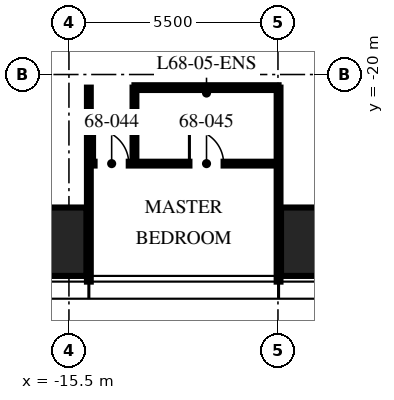
"""IFC4 building model, lengths in metres.
Left out: names, types, materials, properties, quantities, classifications, styles, units other than length and angle.
Written with IfcOpenShell. Run it as: python <this file> out.ifc"""

import sys

from ifc_helpers import new_model, si_unit, direction, frame, frame_2d, origin, origin_2d, place, context, subcontext, project, spatial, rectangle, hollow_rectangle, extrude, element, fill, save


model = new_model("IFC4")
c1 = context("Model", 3, precision=1e-05, world=origin(), true_north=direction((0.0, 1.0)))
c2 = subcontext(c1, "Body", "Model", "MODEL_VIEW")
j1 = project(units=[si_unit("LENGTHUNIT", "METRE"), si_unit("PLANEANGLEUNIT", "RADIAN")], contexts=[c1])
p1 = place(None, origin())
s1 = spatial("IfcSite", under=j1, at=p1, CompositionType="ELEMENT")
p2 = place(p1, origin())
s2 = spatial("IfcBuilding", under=s1, at=p2, CompositionType="ELEMENT")
p3 = place(p2, frame((0.0, 0.0, 270.75)))
s3 = spatial("IfcBuildingStorey", under=s2, at=p3, CompositionType="ELEMENT", Elevation=270.75)
for number, where, z_axis, x_axis in (
    (1, (-8.32, -24.4, 0.0), (0.0, 0.0, 1.0), (1.0, 0.0, 0.0)),
    (2, (-16.64, -24.4, 0.0), (0.0, 0.0, 1.0), (1.0, 0.0, 0.0)),
):
    element("IfcColumn", number, at=place(p3, frame(where, z_axis=z_axis, x_axis=x_axis)), inside=s3, PredefinedType="COLUMN", context=c2, shape_type="SweptSolid", body=[
        extrude(hollow_rectangle(XDim=3.2, YDim=1.8, WallThickness=0.14, at=origin_2d()), origin(), (0.0, 0.0, 1.0), 3.75),
    ])
for number, where, z_axis, x_axis in (
    (3, (-14.976, -20.345, 0.0), (0.0, 0.0, 1.0), (0.0, -1.0, 0.0)),
    (4, (-9.984, -20.345, 0.0), (0.0, 0.0, 1.0), (0.0, -1.0, 0.0)),
):
    element("IfcWall", number, at=place(p3, frame(where, z_axis=z_axis, x_axis=x_axis)), inside=s3, PredefinedType="PARTITIONING", context=c2, shape_type="SweptSolid", body=[
        extrude(rectangle(XDim=5.105, YDim=0.1, at=frame_2d((2.552, 0.0))), origin(), (0.0, 0.0, 1.0), 2.81),
    ])
p4 = place(p3, frame((-14.976, -22.345, 0.0), z_axis=(0.0, 0.0, 1.0), x_axis=(1.0, 0.0, 0.0)))
e5 = element("IfcWall", 5, at=p4, inside=s3, PredefinedType="PARTITIONING", context=c2, shape_type="SweptSolid", body=[
    extrude(rectangle(XDim=4.992, YDim=0.1, at=frame_2d((2.496, 0.0))), origin(), (0.0, 0.0, 1.0), 2.71),
])
p5 = place(p4, frame((0.15, 0.0, 0.0)))
e6 = element("IfcOpeningElement", 6, at=p5, cuts=e5, PredefinedType="OPENING", context=c2, shape_type="SweptSolid", body=[
    extrude(rectangle(XDim=0.9, YDim=2.1, at=frame_2d((0.45, 1.05))), frame((0.0, 0.06, 0.0), z_axis=(0.0, -1.0, 0.0), x_axis=(1.0, 0.0, 0.0)), (0.0, 0.0, 1.0), 0.12),
])
p6 = place(p4, frame((2.646, 0.0, 0.0)))
e7 = element("IfcOpeningElement", 7, at=p6, cuts=e5, PredefinedType="OPENING", context=c2, shape_type="SweptSolid", body=[
    extrude(rectangle(XDim=0.9, YDim=2.1, at=frame_2d((0.45, 1.05))), frame((0.0, 0.06, 0.0), z_axis=(0.0, -1.0, 0.0), x_axis=(1.0, 0.0, 0.0)), (0.0, 0.0, 1.0), 0.12),
])
p7 = place(p3, frame((-13.776, -20.345, 0.0), z_axis=(0.0, 0.0, 1.0), x_axis=(0.0, -1.0, 0.0)))
e8 = element("IfcWall", 8, at=p7, inside=s3, PredefinedType="PARTITIONING", context=c2, shape_type="SweptSolid", body=[
    extrude(rectangle(XDim=2.0, YDim=0.1, at=frame_2d((1.0, 0.0))), origin(), (0.0, 0.0, 1.0), 3.5),
])
p8 = place(p3, frame((-13.776, -20.345, 0.0), z_axis=(0.0, 0.0, 1.0), x_axis=(1.0, 0.0, 0.0)))
e9 = element("IfcWall", 9, at=p8, inside=s3, PredefinedType="PARTITIONING", context=c2, shape_type="SweptSolid", body=[
    extrude(rectangle(XDim=3.792, YDim=0.125, at=frame_2d((1.896, 0.0))), origin(), (0.0, 0.0, 1.0), 2.71),
])
p9 = place(p5, origin())
e10 = element("IfcDoor", 10, at=p9, inside=s3, OperationType="SINGLE_SWING_LEFT", PredefinedType="DOOR", context=c2, shape_type="SweptSolid", body=[
    extrude(rectangle(XDim=0.9, YDim=2.1, at=frame_2d((0.45, 1.05))), frame((0.0, 0.025, 0.0), z_axis=(0.0, -1.0, 0.0), x_axis=(1.0, 0.0, 0.0)), (0.0, 0.0, 1.0), 0.05),
])
fill(e6, e10)
p10 = place(p6, origin())
e11 = element("IfcDoor", 11, at=p10, inside=s3, OperationType="SINGLE_SWING_LEFT", PredefinedType="DOOR", context=c2, shape_type="SweptSolid", body=[
    extrude(rectangle(XDim=0.9, YDim=2.1, at=frame_2d((0.45, 1.05))), frame((0.0, 0.025, 0.0), z_axis=(0.0, -1.0, 0.0), x_axis=(1.0, 0.0, 0.0)), (0.0, 0.0, 1.0), 0.05),
])
fill(e7, e11)
save(model, sys.argv[1])
